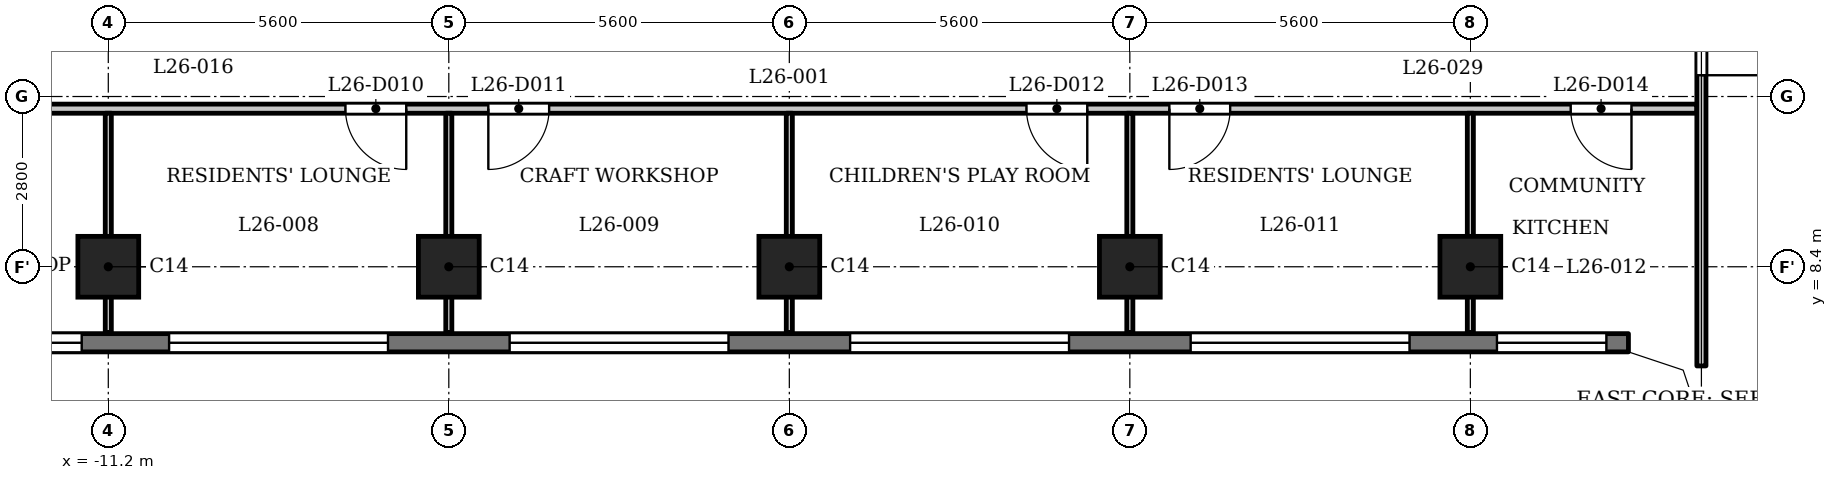
"""IFC4 building model, lengths in metres.
Left out: names, types, materials, properties, quantities, classifications, styles, units other than length and angle.
Written with IfcOpenShell. Run it as: python <this file> out.ifc"""

import sys

from ifc_helpers import new_model, si_unit, direction, frame, frame_2d, origin, origin_2d, place, context, subcontext, project, spatial, polyline, rectangle, outline, extrude, element, fill, save


model = new_model("IFC4")
c1 = context("Model", 3, precision=1e-05, world=origin(), true_north=direction((0.0, 1.0)))
c2 = subcontext(c1, "Body", "Model", "MODEL_VIEW")
j1 = project(units=[si_unit("LENGTHUNIT", "METRE"), si_unit("PLANEANGLEUNIT", "RADIAN")], contexts=[c1])
p1 = place(None, origin())
s1 = spatial("IfcSite", under=j1, at=p1, CompositionType="ELEMENT")
p2 = place(p1, origin())
s2 = spatial("IfcBuilding", under=s1, at=p2, CompositionType="ELEMENT")
p3 = place(p2, frame((0.0, 0.0, 104.3)))
s3 = spatial("IfcBuildingStorey", under=s2, at=p3, CompositionType="ELEMENT", Elevation=104.3)
for number, where, z_axis, x_axis in (
    (1, (-11.2, 8.4, 0.0), (0.0, 0.0, 1.0), (1.0, 0.0, 0.0)),
    (2, (-5.6, 8.4, 0.0), (0.0, 0.0, 1.0), (1.0, 0.0, 0.0)),
    (3, (0.0, 8.4, 0.0), (0.0, 0.0, 1.0), (1.0, 0.0, 0.0)),
    (4, (5.6, 8.4, 0.0), (0.0, 0.0, 1.0), (1.0, 0.0, 0.0)),
    (5, (11.2, 8.4, 0.0), (0.0, 0.0, 1.0), (1.0, 0.0, 0.0)),
):
    element("IfcColumn", number, at=place(p3, frame(where, z_axis=z_axis, x_axis=x_axis)), inside=s3, PredefinedType="COLUMN", context=c2, shape_type="SweptSolid", body=[
        extrude(rectangle(XDim=1.0, YDim=1.0, at=origin_2d()), origin(), (0.0, 0.0, 1.0), 3.5),
    ])
p4 = place(p3, frame((-13.8, 7.15, 0.0), z_axis=(0.0, 0.0, 1.0), x_axis=(1.0, 0.0, 0.0)))
e6 = element("IfcWall", 6, at=p4, inside=s3, PredefinedType="SOLIDWALL", context=c2, shape_type="SweptSolid", body=[
    extrude(rectangle(XDim=27.6, YDim=0.3, at=frame_2d((13.8, 0.0))), origin(), (0.0, 0.0, 1.0), 3.2),
])
p5 = place(p4, frame((0.363, 0.0, 0.9)))
e7 = element("IfcOpeningElement", 7, at=p5, cuts=e6, PredefinedType="OPENING", context=c2, shape_type="SweptSolid", body=[
    extrude(rectangle(XDim=1.8, YDim=1.25, at=frame_2d((0.9, 0.625))), frame((0.0, 0.16, 0.0), z_axis=(0.0, -1.0, 0.0), x_axis=(1.0, 0.0, 0.0)), (0.0, 0.0, 1.0), 0.32),
])
p6 = place(p4, frame((3.6, 0.0, 1.2)))
e8 = element("IfcOpeningElement", 8, at=p6, cuts=e6, PredefinedType="OPENING", context=c2, shape_type="SweptSolid", body=[
    extrude(rectangle(XDim=3.6, YDim=0.95, at=frame_2d((1.8, 0.475))), frame((0.0, 0.16, 0.0), z_axis=(0.0, -1.0, 0.0), x_axis=(1.0, 0.0, 0.0)), (0.0, 0.0, 1.0), 0.32),
])
p7 = place(p4, frame((9.2, 0.0, 1.2)))
e9 = element("IfcOpeningElement", 9, at=p7, cuts=e6, PredefinedType="OPENING", context=c2, shape_type="SweptSolid", body=[
    extrude(rectangle(XDim=3.6, YDim=0.95, at=frame_2d((1.8, 0.475))), frame((0.0, 0.16, 0.0), z_axis=(0.0, -1.0, 0.0), x_axis=(1.0, 0.0, 0.0)), (0.0, 0.0, 1.0), 0.32),
])
p8 = place(p4, frame((14.8, 0.0, 1.2)))
e10 = element("IfcOpeningElement", 10, at=p8, cuts=e6, PredefinedType="OPENING", context=c2, shape_type="SweptSolid", body=[
    extrude(rectangle(XDim=3.6, YDim=0.95, at=frame_2d((1.8, 0.475))), frame((0.0, 0.16, 0.0), z_axis=(0.0, -1.0, 0.0), x_axis=(1.0, 0.0, 0.0)), (0.0, 0.0, 1.0), 0.32),
])
p9 = place(p4, frame((20.4, 0.0, 1.2)))
e11 = element("IfcOpeningElement", 11, at=p9, cuts=e6, PredefinedType="OPENING", context=c2, shape_type="SweptSolid", body=[
    extrude(rectangle(XDim=3.6, YDim=0.95, at=frame_2d((1.8, 0.475))), frame((0.0, 0.16, 0.0), z_axis=(0.0, -1.0, 0.0), x_axis=(1.0, 0.0, 0.0)), (0.0, 0.0, 1.0), 0.32),
])
p10 = place(p4, frame((25.438, 0.0, 0.9)))
e12 = element("IfcOpeningElement", 12, at=p10, cuts=e6, PredefinedType="OPENING", context=c2, shape_type="SweptSolid", body=[
    extrude(rectangle(XDim=1.8, YDim=1.25, at=frame_2d((0.9, 0.625))), frame((0.0, 0.16, 0.0), z_axis=(0.0, -1.0, 0.0), x_axis=(1.0, 0.0, 0.0)), (0.0, 0.0, 1.0), 0.32),
])
p11 = place(p3, frame((-14.925, 11.0, 0.0), z_axis=(0.0, 0.0, 1.0), x_axis=(1.0, 0.0, 0.0)))
e13 = element("IfcWall", 13, at=p11, inside=s3, PredefinedType="PARTITIONING", context=c2, shape_type="SweptSolid", body=[
    extrude(rectangle(XDim=29.85, YDim=0.15, at=frame_2d((14.925, 0.0))), origin(), (0.0, 0.0, 1.0), 3.2),
])
p12 = place(p11, frame((1.076, 0.0, 0.0)))
e14 = element("IfcOpeningElement", 14, at=p12, cuts=e13, PredefinedType="OPENING", context=c2, shape_type="SweptSolid", body=[
    extrude(rectangle(XDim=1.0, YDim=2.1, at=frame_2d((0.5, 1.05))), frame((0.0, 0.085, 0.0), z_axis=(0.0, -1.0, 0.0), x_axis=(1.0, 0.0, 0.0)), (0.0, 0.0, 1.0), 0.17),
])
p13 = place(p11, frame((7.625, 0.0, 0.0)))
e15 = element("IfcOpeningElement", 15, at=p13, cuts=e13, PredefinedType="OPENING", context=c2, shape_type="SweptSolid", body=[
    extrude(rectangle(XDim=1.0, YDim=2.1, at=frame_2d((0.5, 1.05))), frame((0.0, 0.085, 0.0), z_axis=(0.0, -1.0, 0.0), x_axis=(1.0, 0.0, 0.0)), (0.0, 0.0, 1.0), 0.17),
])
p14 = place(p11, frame((9.975, 0.0, 0.0)))
e16 = element("IfcOpeningElement", 16, at=p14, cuts=e13, PredefinedType="OPENING", context=c2, shape_type="SweptSolid", body=[
    extrude(rectangle(XDim=1.0, YDim=2.1, at=frame_2d((0.5, 1.05))), frame((0.0, 0.085, 0.0), z_axis=(0.0, -1.0, 0.0), x_axis=(1.0, 0.0, 0.0)), (0.0, 0.0, 1.0), 0.17),
])
p15 = place(p11, frame((18.825, 0.0, 0.0)))
e17 = element("IfcOpeningElement", 17, at=p15, cuts=e13, PredefinedType="OPENING", context=c2, shape_type="SweptSolid", body=[
    extrude(rectangle(XDim=1.0, YDim=2.1, at=frame_2d((0.5, 1.05))), frame((0.0, 0.085, 0.0), z_axis=(0.0, -1.0, 0.0), x_axis=(1.0, 0.0, 0.0)), (0.0, 0.0, 1.0), 0.17),
])
p16 = place(p11, frame((21.175, 0.0, 0.0)))
e18 = element("IfcOpeningElement", 18, at=p16, cuts=e13, PredefinedType="OPENING", context=c2, shape_type="SweptSolid", body=[
    extrude(rectangle(XDim=1.0, YDim=2.1, at=frame_2d((0.5, 1.05))), frame((0.0, 0.085, 0.0), z_axis=(0.0, -1.0, 0.0), x_axis=(1.0, 0.0, 0.0)), (0.0, 0.0, 1.0), 0.17),
])
p17 = place(p11, frame((27.775, 0.0, 0.0)))
e19 = element("IfcOpeningElement", 19, at=p17, cuts=e13, PredefinedType="OPENING", context=c2, shape_type="SweptSolid", body=[
    extrude(rectangle(XDim=1.0, YDim=2.1, at=frame_2d((0.5, 1.05))), frame((0.0, 0.085, 0.0), z_axis=(0.0, -1.0, 0.0), x_axis=(1.0, 0.0, 0.0)), (0.0, 0.0, 1.0), 0.17),
])
for number, where, z_axis, x_axis in (
    (20, (-11.2, 7.32, 0.0), (0.0, 0.0, 1.0), (0.0, 1.0, 0.0)),
    (21, (-5.6, 7.32, 0.0), (0.0, 0.0, 1.0), (0.0, 1.0, 0.0)),
    (22, (0.0, 7.32, 0.0), (0.0, 0.0, 1.0), (0.0, 1.0, 0.0)),
    (23, (5.6, 7.32, 0.0), (0.0, 0.0, 1.0), (0.0, 1.0, 0.0)),
    (24, (11.2, 7.32, 0.0), (0.0, 0.0, 1.0), (0.0, 1.0, 0.0)),
):
    element("IfcWall", number, at=place(p3, frame(where, z_axis=z_axis, x_axis=x_axis)), inside=s3, PredefinedType="PARTITIONING", context=c2, shape_type="SweptSolid", body=[
        extrude(rectangle(XDim=3.605, YDim=0.1, at=frame_2d((1.802, 0.0))), origin(), (0.0, 0.0, 1.0), 3.2),
    ])
p18 = place(p3, frame((15.0, 6.769, 0.0), z_axis=(0.0, 0.0, 1.0), x_axis=(0.0, 1.0, 0.0)))
e25 = element("IfcWall", 25, at=p18, inside=s3, PredefinedType="PARTITIONING", context=c2, shape_type="SweptSolid", body=[
    extrude(rectangle(XDim=6.356, YDim=0.15, at=frame_2d((3.178, 0.0))), origin(), (0.0, 0.0, 1.0), 3.2),
])
p19 = place(p18, frame((4.781, 0.0, 0.0)))
e26 = element("IfcOpeningElement", 26, at=p19, cuts=e25, PredefinedType="OPENING", context=c2, shape_type="SweptSolid", body=[
    extrude(rectangle(XDim=1.0, YDim=2.1, at=frame_2d((0.5, 1.05))), frame((0.0, 0.085, 0.0), z_axis=(0.0, -1.0, 0.0), x_axis=(1.0, 0.0, 0.0)), (0.0, 0.0, 1.0), 0.17),
])
p20 = place(p3, origin())
e27 = element("IfcWall", 27, at=p20, inside=s3, PredefinedType="SOLIDWALL", context=c2, shape_type="SweptSolid", body=[
    extrude(outline(polyline([(14.937, 6.937), (13.849, 7.3), (13.8, 7.3), (13.8, 7.0), (14.7, 6.7), (15.0, 5.8), (15.3, 5.8), (15.3, 5.849), (14.937, 6.937)])), origin(), (0.0, 0.0, 1.0), 3.2),
])
p21 = place(p19, origin())
e28 = element("IfcDoor", 28, at=p21, inside=s3, OperationType="SINGLE_SWING_LEFT", PredefinedType="DOOR", context=c2, shape_type="SweptSolid", body=[
    extrude(rectangle(XDim=1.0, YDim=2.1, at=frame_2d((0.5, 1.05))), frame((0.0, 0.025, 0.0), z_axis=(0.0, -1.0, 0.0), x_axis=(1.0, 0.0, 0.0)), (0.0, 0.0, 1.0), 0.05),
])
fill(e26, e28)
p22 = place(p13, origin())
e29 = element("IfcDoor", 29, at=p22, inside=s3, OperationType="SINGLE_SWING_RIGHT", PredefinedType="DOOR", context=c2, shape_type="SweptSolid", body=[
    extrude(rectangle(XDim=1.0, YDim=2.1, at=frame_2d((0.5, 1.05))), frame((0.0, 0.025, 0.0), z_axis=(0.0, -1.0, 0.0), x_axis=(1.0, 0.0, 0.0)), (0.0, 0.0, 1.0), 0.05),
])
fill(e15, e29)
p23 = place(p14, origin())
e30 = element("IfcDoor", 30, at=p23, inside=s3, OperationType="SINGLE_SWING_LEFT", PredefinedType="DOOR", context=c2, shape_type="SweptSolid", body=[
    extrude(rectangle(XDim=1.0, YDim=2.1, at=frame_2d((0.5, 1.05))), frame((0.0, 0.025, 0.0), z_axis=(0.0, -1.0, 0.0), x_axis=(1.0, 0.0, 0.0)), (0.0, 0.0, 1.0), 0.05),
])
fill(e16, e30)
p24 = place(p15, origin())
e31 = element("IfcDoor", 31, at=p24, inside=s3, OperationType="SINGLE_SWING_RIGHT", PredefinedType="DOOR", context=c2, shape_type="SweptSolid", body=[
    extrude(rectangle(XDim=1.0, YDim=2.1, at=frame_2d((0.5, 1.05))), frame((0.0, 0.025, 0.0), z_axis=(0.0, -1.0, 0.0), x_axis=(1.0, 0.0, 0.0)), (0.0, 0.0, 1.0), 0.05),
])
fill(e17, e31)
p25 = place(p16, origin())
e32 = element("IfcDoor", 32, at=p25, inside=s3, OperationType="SINGLE_SWING_LEFT", PredefinedType="DOOR", context=c2, shape_type="SweptSolid", body=[
    extrude(rectangle(XDim=1.0, YDim=2.1, at=frame_2d((0.5, 1.05))), frame((0.0, 0.025, 0.0), z_axis=(0.0, -1.0, 0.0), x_axis=(1.0, 0.0, 0.0)), (0.0, 0.0, 1.0), 0.05),
])
fill(e18, e32)
p26 = place(p17, origin())
e33 = element("IfcDoor", 33, at=p26, inside=s3, OperationType="SINGLE_SWING_RIGHT", PredefinedType="DOOR", context=c2, shape_type="SweptSolid", body=[
    extrude(rectangle(XDim=1.0, YDim=2.1, at=frame_2d((0.5, 1.05))), frame((0.0, 0.025, 0.0), z_axis=(0.0, -1.0, 0.0), x_axis=(1.0, 0.0, 0.0)), (0.0, 0.0, 1.0), 0.05),
])
fill(e19, e33)
p27 = place(p5, origin())
e34 = element("IfcWindow", 34, at=p27, inside=s3, PartitioningType="SINGLE_PANEL", PredefinedType="WINDOW", context=c2, shape_type="SweptSolid", body=[
    extrude(rectangle(XDim=1.8, YDim=1.25, at=frame_2d((0.9, 0.625))), frame((0.0, 0.03, 0.0), z_axis=(0.0, -1.0, 0.0), x_axis=(1.0, 0.0, 0.0)), (0.0, 0.0, 1.0), 0.06),
])
fill(e7, e34)
p28 = place(p6, origin())
e35 = element("IfcWindow", 35, at=p28, inside=s3, PartitioningType="SINGLE_PANEL", PredefinedType="WINDOW", context=c2, shape_type="SweptSolid", body=[
    extrude(rectangle(XDim=3.6, YDim=0.95, at=frame_2d((1.8, 0.475))), frame((0.0, 0.03, 0.0), z_axis=(0.0, -1.0, 0.0), x_axis=(1.0, 0.0, 0.0)), (0.0, 0.0, 1.0), 0.06),
])
fill(e8, e35)
p29 = place(p7, origin())
e36 = element("IfcWindow", 36, at=p29, inside=s3, PartitioningType="SINGLE_PANEL", PredefinedType="WINDOW", context=c2, shape_type="SweptSolid", body=[
    extrude(rectangle(XDim=3.6, YDim=0.95, at=frame_2d((1.8, 0.475))), frame((0.0, 0.03, 0.0), z_axis=(0.0, -1.0, 0.0), x_axis=(1.0, 0.0, 0.0)), (0.0, 0.0, 1.0), 0.06),
])
fill(e9, e36)
p30 = place(p8, origin())
e37 = element("IfcWindow", 37, at=p30, inside=s3, PartitioningType="SINGLE_PANEL", PredefinedType="WINDOW", context=c2, shape_type="SweptSolid", body=[
    extrude(rectangle(XDim=3.6, YDim=0.95, at=frame_2d((1.8, 0.475))), frame((0.0, 0.03, 0.0), z_axis=(0.0, -1.0, 0.0), x_axis=(1.0, 0.0, 0.0)), (0.0, 0.0, 1.0), 0.06),
])
fill(e10, e37)
p31 = place(p9, origin())
e38 = element("IfcWindow", 38, at=p31, inside=s3, PartitioningType="SINGLE_PANEL", PredefinedType="WINDOW", context=c2, shape_type="SweptSolid", body=[
    extrude(rectangle(XDim=3.6, YDim=0.95, at=frame_2d((1.8, 0.475))), frame((0.0, 0.03, 0.0), z_axis=(0.0, -1.0, 0.0), x_axis=(1.0, 0.0, 0.0)), (0.0, 0.0, 1.0), 0.06),
])
fill(e11, e38)
p32 = place(p10, origin())
e39 = element("IfcWindow", 39, at=p32, inside=s3, PartitioningType="SINGLE_PANEL", PredefinedType="WINDOW", context=c2, shape_type="SweptSolid", body=[
    extrude(rectangle(XDim=1.8, YDim=1.25, at=frame_2d((0.9, 0.625))), frame((0.0, 0.03, 0.0), z_axis=(0.0, -1.0, 0.0), x_axis=(1.0, 0.0, 0.0)), (0.0, 0.0, 1.0), 0.06),
])
fill(e12, e39)
save(model, sys.argv[1])
